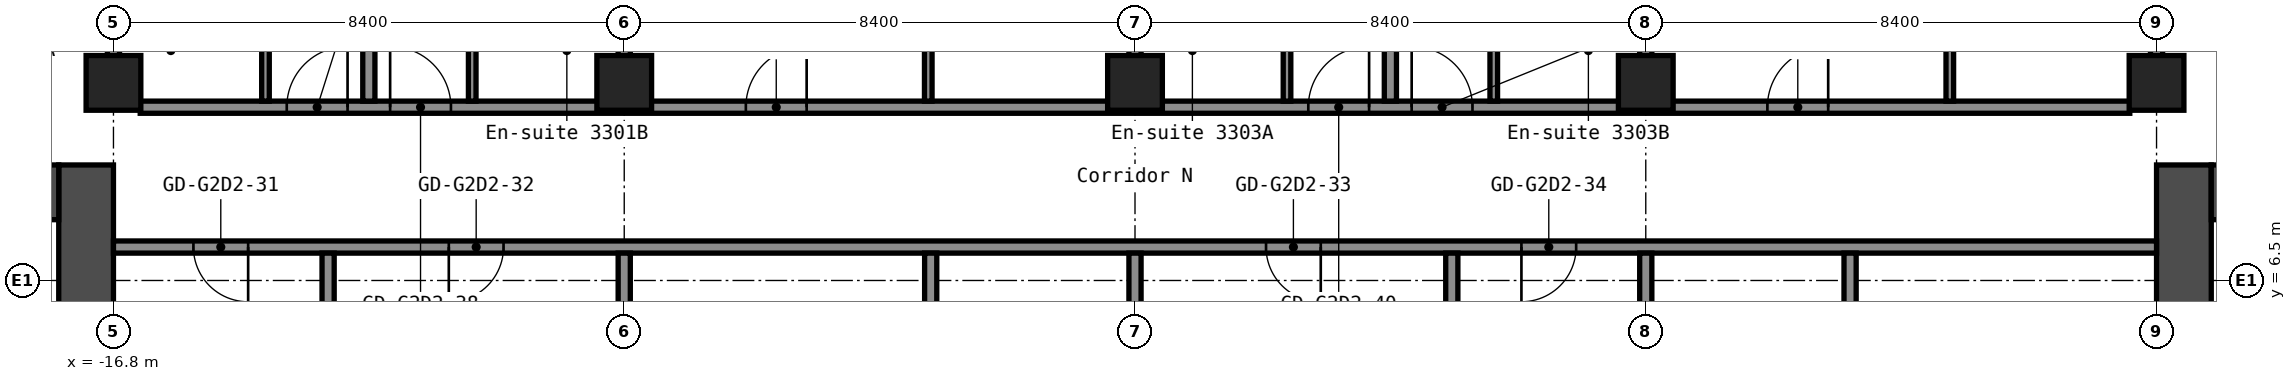
"""IFC4 building model, lengths in metres.
Left out: names, types, materials, properties, quantities, classifications, styles, units other than length and angle.
Written with IfcOpenShell. Run it as: python <this file> out.ifc"""

import sys

from ifc_helpers import new_model, si_unit, direction, frame, frame_2d, origin, origin_2d, place, context, subcontext, project, spatial, rectangle, hollow_rectangle, extrude, element, fill, save


model = new_model("IFC4")
c1 = context("Model", 3, precision=1e-05, world=origin(), true_north=direction((0.0, 1.0)))
c2 = subcontext(c1, "Body", "Model", "MODEL_VIEW")
j1 = project(units=[si_unit("LENGTHUNIT", "METRE"), si_unit("PLANEANGLEUNIT", "RADIAN")], contexts=[c1])
p1 = place(None, origin())
s1 = spatial("IfcSite", under=j1, at=p1, CompositionType="ELEMENT")
p2 = place(p1, origin())
s2 = spatial("IfcBuilding", under=s1, at=p2, CompositionType="ELEMENT")
p3 = place(p2, frame((0.0, 0.0, 117.0)))
s3 = spatial("IfcBuildingStorey", under=s2, at=p3, CompositionType="ELEMENT", Elevation=117.0)
for number, where, z_axis, x_axis in (
    (1, (-16.8, 9.75, 0.0), (0.0, 0.0, 1.0), (1.0, 0.0, 0.0)),
    (2, (-8.4, 9.75, 0.0), (0.0, 0.0, 1.0), (1.0, 0.0, 0.0)),
    (3, (0.0, 9.75, 0.0), (0.0, 0.0, 1.0), (1.0, 0.0, 0.0)),
    (4, (8.4, 9.75, 0.0), (0.0, 0.0, 1.0), (1.0, 0.0, 0.0)),
    (5, (16.8, 9.75, 0.0), (0.0, 0.0, 1.0), (1.0, 0.0, 0.0)),
):
    element("IfcColumn", number, at=place(p3, frame(where, z_axis=z_axis, x_axis=x_axis)), inside=s3, PredefinedType="COLUMN", context=c2, shape_type="SweptSolid", body=[
        extrude(hollow_rectangle(XDim=0.9, YDim=0.9, WallThickness=0.036, at=origin_2d()), origin(), (0.0, 0.0, 1.0), 2.9),
    ])
p4 = place(p3, frame((-17.25, -8.4, 0.0), z_axis=(0.0, 0.0, 1.0), x_axis=(0.0, 1.0, 0.0)))
e6 = element("IfcWall", 6, at=p4, inside=s3, PredefinedType="SHEAR", context=c2, shape_type="SweptSolid", body=[
    extrude(rectangle(XDim=16.8, YDim=0.9, at=frame_2d((8.4, 0.0))), origin(), (0.0, 0.0, 1.0), 2.9),
])
p5 = place(p4, frame((7.6, 0.0, 0.0)))
e7 = element("IfcOpeningElement", 7, at=p5, cuts=e6, PredefinedType="OPENING", context=c2, shape_type="SweptSolid", body=[
    extrude(rectangle(XDim=1.2, YDim=2.1, at=frame_2d((0.6, 1.05))), frame((0.0, 0.46, 0.0), z_axis=(0.0, -1.0, 0.0), x_axis=(1.0, 0.0, 0.0)), (0.0, 0.0, 1.0), 0.92),
])
p6 = place(p3, frame((-32.7, 7.95, 0.0), z_axis=(0.0, 0.0, 1.0), x_axis=(1.0, 0.0, 0.0)))
e8 = element("IfcWall", 8, at=p6, inside=s3, PredefinedType="SHEAR", context=c2, shape_type="SweptSolid", body=[
    extrude(rectangle(XDim=15.0, YDim=0.9, at=frame_2d((7.5, 0.0))), origin(), (0.0, 0.0, 1.0), 2.9),
])
p7 = place(p6, frame((3.4, 0.0, 0.0)))
e9 = element("IfcOpeningElement", 9, at=p7, cuts=e8, PredefinedType="OPENING", context=c2, shape_type="SweptSolid", body=[
    extrude(rectangle(XDim=1.2, YDim=2.1, at=frame_2d((0.6, 1.05))), frame((0.0, 0.46, 0.0), z_axis=(0.0, -1.0, 0.0), x_axis=(1.0, 0.0, 0.0)), (0.0, 0.0, 1.0), 0.92),
])
p8 = place(p6, frame((0.75, 0.0, 0.0)))
e10 = element("IfcOpeningElement", 10, at=p8, cuts=e8, PredefinedType="OPENING", context=c2, shape_type="SweptSolid", body=[
    extrude(rectangle(XDim=0.9, YDim=2.1, at=frame_2d((0.45, 1.05))), frame((0.0, 0.46, 0.0), z_axis=(0.0, -1.0, 0.0), x_axis=(1.0, 0.0, 0.0)), (0.0, 0.0, 1.0), 0.92),
])
p9 = place(p3, frame((17.25, -8.4, 0.0), z_axis=(0.0, 0.0, 1.0), x_axis=(0.0, 1.0, 0.0)))
e11 = element("IfcWall", 11, at=p9, inside=s3, PredefinedType="SHEAR", context=c2, shape_type="SweptSolid", body=[
    extrude(rectangle(XDim=16.8, YDim=0.9, at=frame_2d((8.4, 0.0))), origin(), (0.0, 0.0, 1.0), 2.9),
])
p10 = place(p9, frame((7.6, 0.0, 0.0)))
e12 = element("IfcOpeningElement", 12, at=p10, cuts=e11, PredefinedType="OPENING", context=c2, shape_type="SweptSolid", body=[
    extrude(rectangle(XDim=1.2, YDim=2.1, at=frame_2d((0.6, 1.05))), frame((0.0, 0.46, 0.0), z_axis=(0.0, -1.0, 0.0), x_axis=(1.0, 0.0, 0.0)), (0.0, 0.0, 1.0), 0.92),
])
p11 = place(p3, frame((17.7, 7.95, 0.0), z_axis=(0.0, 0.0, 1.0), x_axis=(1.0, 0.0, 0.0)))
e13 = element("IfcWall", 13, at=p11, inside=s3, PredefinedType="SHEAR", context=c2, shape_type="SweptSolid", body=[
    extrude(rectangle(XDim=15.0, YDim=0.9, at=frame_2d((7.5, 0.0))), origin(), (0.0, 0.0, 1.0), 2.9),
])
p12 = place(p11, frame((10.4, 0.0, 0.0)))
e14 = element("IfcOpeningElement", 14, at=p12, cuts=e13, PredefinedType="OPENING", context=c2, shape_type="SweptSolid", body=[
    extrude(rectangle(XDim=1.2, YDim=2.1, at=frame_2d((0.6, 1.05))), frame((0.0, 0.46, 0.0), z_axis=(0.0, -1.0, 0.0), x_axis=(1.0, 0.0, 0.0)), (0.0, 0.0, 1.0), 0.92),
])
p13 = place(p11, frame((13.35, 0.0, 0.0)))
e15 = element("IfcOpeningElement", 15, at=p13, cuts=e13, PredefinedType="OPENING", context=c2, shape_type="SweptSolid", body=[
    extrude(rectangle(XDim=0.9, YDim=2.1, at=frame_2d((0.45, 1.05))), frame((0.0, 0.46, 0.0), z_axis=(0.0, -1.0, 0.0), x_axis=(1.0, 0.0, 0.0)), (0.0, 0.0, 1.0), 0.92),
])
p14 = place(p3, frame((-16.8, 7.05, 0.0), z_axis=(0.0, 0.0, 1.0), x_axis=(1.0, 0.0, 0.0)))
e16 = element("IfcWall", 16, at=p14, inside=s3, PredefinedType="PARTITIONING", context=c2, shape_type="SweptSolid", body=[
    extrude(rectangle(XDim=33.6, YDim=0.2, at=frame_2d((16.8, 0.0))), origin(), (0.0, 0.0, 1.0), 2.9),
])
p15 = place(p14, frame((1.315, 0.0, 0.0)))
e17 = element("IfcOpeningElement", 17, at=p15, cuts=e16, PredefinedType="OPENING", context=c2, shape_type="SweptSolid", body=[
    extrude(rectangle(XDim=0.9, YDim=2.1, at=frame_2d((0.45, 1.05))), frame((0.0, 0.11, 0.0), z_axis=(0.0, -1.0, 0.0), x_axis=(1.0, 0.0, 0.0)), (0.0, 0.0, 1.0), 0.22),
])
p16 = place(p14, frame((5.515, 0.0, 0.0)))
e18 = element("IfcOpeningElement", 18, at=p16, cuts=e16, PredefinedType="OPENING", context=c2, shape_type="SweptSolid", body=[
    extrude(rectangle(XDim=0.9, YDim=2.1, at=frame_2d((0.45, 1.05))), frame((0.0, 0.11, 0.0), z_axis=(0.0, -1.0, 0.0), x_axis=(1.0, 0.0, 0.0)), (0.0, 0.0, 1.0), 0.22),
])
p17 = place(p14, frame((18.955, 0.0, 0.0)))
e19 = element("IfcOpeningElement", 19, at=p17, cuts=e16, PredefinedType="OPENING", context=c2, shape_type="SweptSolid", body=[
    extrude(rectangle(XDim=0.9, YDim=2.1, at=frame_2d((0.45, 1.05))), frame((0.0, 0.11, 0.0), z_axis=(0.0, -1.0, 0.0), x_axis=(1.0, 0.0, 0.0)), (0.0, 0.0, 1.0), 0.22),
])
p18 = place(p14, frame((23.155, 0.0, 0.0)))
e20 = element("IfcOpeningElement", 20, at=p18, cuts=e16, PredefinedType="OPENING", context=c2, shape_type="SweptSolid", body=[
    extrude(rectangle(XDim=0.9, YDim=2.1, at=frame_2d((0.45, 1.05))), frame((0.0, 0.11, 0.0), z_axis=(0.0, -1.0, 0.0), x_axis=(1.0, 0.0, 0.0)), (0.0, 0.0, 1.0), 0.22),
])
p19 = place(p3, frame((-16.36, 9.35, 0.0), z_axis=(0.0, 0.0, 1.0), x_axis=(1.0, 0.0, 0.0)))
e21 = element("IfcWall", 21, at=p19, inside=s3, PredefinedType="PARTITIONING", context=c2, shape_type="SweptSolid", body=[
    extrude(rectangle(XDim=32.72, YDim=0.2, at=frame_2d((16.36, 0.0))), origin(), (0.0, 0.0, 1.0), 2.9),
])
p20 = place(p19, frame((2.41, 0.0, 0.0)))
e22 = element("IfcOpeningElement", 22, at=p20, cuts=e21, PredefinedType="OPENING", context=c2, shape_type="SweptSolid", body=[
    extrude(rectangle(XDim=1.0, YDim=2.1, at=frame_2d((0.5, 1.05))), frame((0.0, 0.11, 0.0), z_axis=(0.0, -1.0, 0.0), x_axis=(1.0, 0.0, 0.0)), (0.0, 0.0, 1.0), 0.22),
])
p21 = place(p19, frame((4.11, 0.0, 0.0)))
e23 = element("IfcOpeningElement", 23, at=p21, cuts=e21, PredefinedType="OPENING", context=c2, shape_type="SweptSolid", body=[
    extrude(rectangle(XDim=1.0, YDim=2.1, at=frame_2d((0.5, 1.05))), frame((0.0, 0.11, 0.0), z_axis=(0.0, -1.0, 0.0), x_axis=(1.0, 0.0, 0.0)), (0.0, 0.0, 1.0), 0.22),
])
p22 = place(p19, frame((9.96, 0.0, 0.0)))
e24 = element("IfcOpeningElement", 24, at=p22, cuts=e21, PredefinedType="OPENING", context=c2, shape_type="SweptSolid", body=[
    extrude(rectangle(XDim=1.0, YDim=2.1, at=frame_2d((0.5, 1.05))), frame((0.0, 0.11, 0.0), z_axis=(0.0, -1.0, 0.0), x_axis=(1.0, 0.0, 0.0)), (0.0, 0.0, 1.0), 0.22),
])
p23 = place(p19, frame((19.21, 0.0, 0.0)))
e25 = element("IfcOpeningElement", 25, at=p23, cuts=e21, PredefinedType="OPENING", context=c2, shape_type="SweptSolid", body=[
    extrude(rectangle(XDim=1.0, YDim=2.1, at=frame_2d((0.5, 1.05))), frame((0.0, 0.11, 0.0), z_axis=(0.0, -1.0, 0.0), x_axis=(1.0, 0.0, 0.0)), (0.0, 0.0, 1.0), 0.22),
])
p24 = place(p19, frame((20.91, 0.0, 0.0)))
e26 = element("IfcOpeningElement", 26, at=p24, cuts=e21, PredefinedType="OPENING", context=c2, shape_type="SweptSolid", body=[
    extrude(rectangle(XDim=1.0, YDim=2.1, at=frame_2d((0.5, 1.05))), frame((0.0, 0.11, 0.0), z_axis=(0.0, -1.0, 0.0), x_axis=(1.0, 0.0, 0.0)), (0.0, 0.0, 1.0), 0.22),
])
p25 = place(p19, frame((26.76, 0.0, 0.0)))
e27 = element("IfcOpeningElement", 27, at=p25, cuts=e21, PredefinedType="OPENING", context=c2, shape_type="SweptSolid", body=[
    extrude(rectangle(XDim=1.0, YDim=2.1, at=frame_2d((0.5, 1.05))), frame((0.0, 0.11, 0.0), z_axis=(0.0, -1.0, 0.0), x_axis=(1.0, 0.0, 0.0)), (0.0, 0.0, 1.0), 0.22),
])
p26 = place(p3, frame((-16.8, 10.19, 0.0), z_axis=(0.0, 0.0, 1.0), x_axis=(0.0, 1.0, 0.0)))
e28 = element("IfcWall", 28, at=p26, inside=s3, PredefinedType="PARTITIONING", context=c2, shape_type="SweptSolid", body=[
    extrude(rectangle(XDim=13.36, YDim=0.2, at=frame_2d((6.68, 0.0))), origin(), (0.0, 0.0, 1.0), 2.9),
])
p27 = place(p3, frame((-14.3, 9.45, 0.0), z_axis=(0.0, 0.0, 1.0), x_axis=(0.0, 1.0, 0.0)))
e29 = element("IfcWall", 29, at=p27, inside=s3, PredefinedType="PARTITIONING", context=c2, shape_type="SweptSolid", body=[
    extrude(rectangle(XDim=2.9, YDim=0.125, at=frame_2d((1.45, 0.0))), origin(), (0.0, 0.0, 1.0), 2.9),
])
p28 = place(p27, frame((1.5, 0.0, 0.0)))
e30 = element("IfcOpeningElement", 30, at=p28, cuts=e29, PredefinedType="OPENING", context=c2, shape_type="SweptSolid", body=[
    extrude(rectangle(XDim=0.8, YDim=2.1, at=frame_2d((0.4, 1.05))), frame((0.0, 0.073, 0.0), z_axis=(0.0, -1.0, 0.0), x_axis=(1.0, 0.0, 0.0)), (0.0, 0.0, 1.0), 0.145),
])
p29 = place(p3, frame((-13.27, 1.05, 0.0), z_axis=(0.0, 0.0, 1.0), x_axis=(0.0, 1.0, 0.0)))
e31 = element("IfcWall", 31, at=p29, inside=s3, PredefinedType="PARTITIONING", context=c2, shape_type="SweptSolid", body=[
    extrude(rectangle(XDim=5.9, YDim=0.2, at=frame_2d((2.95, 0.0))), origin(), (0.0, 0.0, 1.0), 2.9),
])
p30 = place(p3, frame((-12.6, 9.45, 0.0), z_axis=(0.0, 0.0, 1.0), x_axis=(0.0, 1.0, 0.0)))
e32 = element("IfcWall", 32, at=p30, inside=s3, PredefinedType="PARTITIONING", context=c2, shape_type="SweptSolid", body=[
    extrude(rectangle(XDim=14.1, YDim=0.2, at=frame_2d((7.05, 0.0))), origin(), (0.0, 0.0, 1.0), 2.9),
])
p31 = place(p3, frame((-10.9, 9.45, 0.0), z_axis=(0.0, 0.0, 1.0), x_axis=(0.0, 1.0, 0.0)))
e33 = element("IfcWall", 33, at=p31, inside=s3, PredefinedType="PARTITIONING", context=c2, shape_type="SweptSolid", body=[
    extrude(rectangle(XDim=2.9, YDim=0.125, at=frame_2d((1.45, 0.0))), origin(), (0.0, 0.0, 1.0), 2.9),
])
p32 = place(p31, frame((1.5, 0.0, 0.0)))
e34 = element("IfcOpeningElement", 34, at=p32, cuts=e33, PredefinedType="OPENING", context=c2, shape_type="SweptSolid", body=[
    extrude(rectangle(XDim=0.8, YDim=2.1, at=frame_2d((0.4, 1.05))), frame((0.0, 0.073, 0.0), z_axis=(0.0, -1.0, 0.0), x_axis=(1.0, 0.0, 0.0)), (0.0, 0.0, 1.0), 0.145),
])
p33 = place(p3, frame((-8.4, 1.05, 0.0), z_axis=(0.0, 0.0, 1.0), x_axis=(0.0, 1.0, 0.0)))
e35 = element("IfcWall", 35, at=p33, inside=s3, PredefinedType="PARTITIONING", context=c2, shape_type="SweptSolid", body=[
    extrude(rectangle(XDim=5.9, YDim=0.2, at=frame_2d((2.95, 0.0))), origin(), (0.0, 0.0, 1.0), 2.9),
])
p34 = place(p3, frame((-8.4, 10.19, 0.0), z_axis=(0.0, 0.0, 1.0), x_axis=(0.0, 1.0, 0.0)))
e36 = element("IfcWall", 36, at=p34, inside=s3, PredefinedType="PARTITIONING", context=c2, shape_type="SweptSolid", body=[
    extrude(rectangle(XDim=13.36, YDim=0.2, at=frame_2d((6.68, 0.0))), origin(), (0.0, 0.0, 1.0), 2.9),
])
p35 = place(p3, frame((-3.4, 9.45, 0.0), z_axis=(0.0, 0.0, 1.0), x_axis=(0.0, 1.0, 0.0)))
e37 = element("IfcWall", 37, at=p35, inside=s3, PredefinedType="PARTITIONING", context=c2, shape_type="SweptSolid", body=[
    extrude(rectangle(XDim=3.3, YDim=0.125, at=frame_2d((1.65, 0.0))), origin(), (0.0, 0.0, 1.0), 2.9),
])
for number, where, z_axis, x_axis in (
    (38, (-3.36, 1.05, 0.0), (0.0, 0.0, 1.0), (0.0, 1.0, 0.0)),
    (39, (0.0, 1.05, 0.0), (0.0, 0.0, 1.0), (0.0, 1.0, 0.0)),
):
    element("IfcWall", number, at=place(p3, frame(where, z_axis=z_axis, x_axis=x_axis)), inside=s3, PredefinedType="PARTITIONING", context=c2, shape_type="SweptSolid", body=[
        extrude(rectangle(XDim=5.9, YDim=0.2, at=frame_2d((2.95, 0.0))), origin(), (0.0, 0.0, 1.0), 2.9),
    ])
p36 = place(p3, frame((0.0, 10.19, 0.0), z_axis=(0.0, 0.0, 1.0), x_axis=(0.0, 1.0, 0.0)))
e40 = element("IfcWall", 40, at=p36, inside=s3, PredefinedType="PARTITIONING", context=c2, shape_type="SweptSolid", body=[
    extrude(rectangle(XDim=13.36, YDim=0.2, at=frame_2d((6.68, 0.0))), origin(), (0.0, 0.0, 1.0), 2.9),
])
p37 = place(p3, frame((2.5, 9.45, 0.0), z_axis=(0.0, 0.0, 1.0), x_axis=(0.0, 1.0, 0.0)))
e41 = element("IfcWall", 41, at=p37, inside=s3, PredefinedType="PARTITIONING", context=c2, shape_type="SweptSolid", body=[
    extrude(rectangle(XDim=2.9, YDim=0.125, at=frame_2d((1.45, 0.0))), origin(), (0.0, 0.0, 1.0), 2.9),
])
p38 = place(p37, frame((1.5, 0.0, 0.0)))
e42 = element("IfcOpeningElement", 42, at=p38, cuts=e41, PredefinedType="OPENING", context=c2, shape_type="SweptSolid", body=[
    extrude(rectangle(XDim=0.8, YDim=2.1, at=frame_2d((0.4, 1.05))), frame((0.0, 0.073, 0.0), z_axis=(0.0, -1.0, 0.0), x_axis=(1.0, 0.0, 0.0)), (0.0, 0.0, 1.0), 0.145),
])
p39 = place(p3, frame((4.2, 9.45, 0.0), z_axis=(0.0, 0.0, 1.0), x_axis=(0.0, 1.0, 0.0)))
e43 = element("IfcWall", 43, at=p39, inside=s3, PredefinedType="PARTITIONING", context=c2, shape_type="SweptSolid", body=[
    extrude(rectangle(XDim=14.1, YDim=0.2, at=frame_2d((7.05, 0.0))), origin(), (0.0, 0.0, 1.0), 2.9),
])
p40 = place(p3, frame((5.21, 1.05, 0.0), z_axis=(0.0, 0.0, 1.0), x_axis=(0.0, 1.0, 0.0)))
e44 = element("IfcWall", 44, at=p40, inside=s3, PredefinedType="PARTITIONING", context=c2, shape_type="SweptSolid", body=[
    extrude(rectangle(XDim=5.9, YDim=0.2, at=frame_2d((2.95, 0.0))), origin(), (0.0, 0.0, 1.0), 2.9),
])
p41 = place(p3, frame((5.9, 9.45, 0.0), z_axis=(0.0, 0.0, 1.0), x_axis=(0.0, 1.0, 0.0)))
e45 = element("IfcWall", 45, at=p41, inside=s3, PredefinedType="PARTITIONING", context=c2, shape_type="SweptSolid", body=[
    extrude(rectangle(XDim=2.9, YDim=0.125, at=frame_2d((1.45, 0.0))), origin(), (0.0, 0.0, 1.0), 2.9),
])
p42 = place(p41, frame((1.5, 0.0, 0.0)))
e46 = element("IfcOpeningElement", 46, at=p42, cuts=e45, PredefinedType="OPENING", context=c2, shape_type="SweptSolid", body=[
    extrude(rectangle(XDim=0.8, YDim=2.1, at=frame_2d((0.4, 1.05))), frame((0.0, 0.073, 0.0), z_axis=(0.0, -1.0, 0.0), x_axis=(1.0, 0.0, 0.0)), (0.0, 0.0, 1.0), 0.145),
])
p43 = place(p3, frame((8.4, 1.05, 0.0), z_axis=(0.0, 0.0, 1.0), x_axis=(0.0, 1.0, 0.0)))
e47 = element("IfcWall", 47, at=p43, inside=s3, PredefinedType="PARTITIONING", context=c2, shape_type="SweptSolid", body=[
    extrude(rectangle(XDim=5.9, YDim=0.2, at=frame_2d((2.95, 0.0))), origin(), (0.0, 0.0, 1.0), 2.9),
])
p44 = place(p3, frame((8.4, 10.19, 0.0), z_axis=(0.0, 0.0, 1.0), x_axis=(0.0, 1.0, 0.0)))
e48 = element("IfcWall", 48, at=p44, inside=s3, PredefinedType="PARTITIONING", context=c2, shape_type="SweptSolid", body=[
    extrude(rectangle(XDim=13.36, YDim=0.2, at=frame_2d((6.68, 0.0))), origin(), (0.0, 0.0, 1.0), 2.9),
])
p45 = place(p3, frame((11.76, 1.05, 0.0), z_axis=(0.0, 0.0, 1.0), x_axis=(0.0, 1.0, 0.0)))
e49 = element("IfcWall", 49, at=p45, inside=s3, PredefinedType="PARTITIONING", context=c2, shape_type="SweptSolid", body=[
    extrude(rectangle(XDim=5.9, YDim=0.2, at=frame_2d((2.95, 0.0))), origin(), (0.0, 0.0, 1.0), 2.9),
])
p46 = place(p3, frame((13.4, 9.45, 0.0), z_axis=(0.0, 0.0, 1.0), x_axis=(0.0, 1.0, 0.0)))
e50 = element("IfcWall", 50, at=p46, inside=s3, PredefinedType="PARTITIONING", context=c2, shape_type="SweptSolid", body=[
    extrude(rectangle(XDim=3.3, YDim=0.125, at=frame_2d((1.65, 0.0))), origin(), (0.0, 0.0, 1.0), 2.9),
])
p47 = place(p3, frame((16.8, 10.19, 0.0), z_axis=(0.0, 0.0, 1.0), x_axis=(0.0, 1.0, 0.0)))
e51 = element("IfcWall", 51, at=p47, inside=s3, PredefinedType="PARTITIONING", context=c2, shape_type="SweptSolid", body=[
    extrude(rectangle(XDim=13.36, YDim=0.2, at=frame_2d((6.68, 0.0))), origin(), (0.0, 0.0, 1.0), 2.9),
])
p48 = place(p15, origin())
e52 = element("IfcDoor", 52, at=p48, inside=s3, OperationType="SINGLE_SWING_RIGHT", PredefinedType="DOOR", context=c2, shape_type="SweptSolid", body=[
    extrude(rectangle(XDim=0.9, YDim=2.1, at=frame_2d((0.45, 1.05))), frame((0.0, 0.025, 0.0), z_axis=(0.0, -1.0, 0.0), x_axis=(1.0, 0.0, 0.0)), (0.0, 0.0, 1.0), 0.05),
])
fill(e17, e52)
p49 = place(p16, origin())
e53 = element("IfcDoor", 53, at=p49, inside=s3, OperationType="SINGLE_SWING_LEFT", PredefinedType="DOOR", context=c2, shape_type="SweptSolid", body=[
    extrude(rectangle(XDim=0.9, YDim=2.1, at=frame_2d((0.45, 1.05))), frame((0.0, 0.025, 0.0), z_axis=(0.0, -1.0, 0.0), x_axis=(1.0, 0.0, 0.0)), (0.0, 0.0, 1.0), 0.05),
])
fill(e18, e53)
p50 = place(p17, origin())
e54 = element("IfcDoor", 54, at=p50, inside=s3, OperationType="SINGLE_SWING_RIGHT", PredefinedType="DOOR", context=c2, shape_type="SweptSolid", body=[
    extrude(rectangle(XDim=0.9, YDim=2.1, at=frame_2d((0.45, 1.05))), frame((0.0, 0.025, 0.0), z_axis=(0.0, -1.0, 0.0), x_axis=(1.0, 0.0, 0.0)), (0.0, 0.0, 1.0), 0.05),
])
fill(e19, e54)
p51 = place(p18, origin())
e55 = element("IfcDoor", 55, at=p51, inside=s3, OperationType="SINGLE_SWING_LEFT", PredefinedType="DOOR", context=c2, shape_type="SweptSolid", body=[
    extrude(rectangle(XDim=0.9, YDim=2.1, at=frame_2d((0.45, 1.05))), frame((0.0, 0.025, 0.0), z_axis=(0.0, -1.0, 0.0), x_axis=(1.0, 0.0, 0.0)), (0.0, 0.0, 1.0), 0.05),
])
fill(e20, e55)
p52 = place(p20, origin())
e56 = element("IfcDoor", 56, at=p52, inside=s3, OperationType="SINGLE_SWING_LEFT", PredefinedType="DOOR", context=c2, shape_type="SweptSolid", body=[
    extrude(rectangle(XDim=1.0, YDim=2.1, at=frame_2d((0.5, 1.05))), frame((0.0, 0.025, 0.0), z_axis=(0.0, -1.0, 0.0), x_axis=(1.0, 0.0, 0.0)), (0.0, 0.0, 1.0), 0.05),
])
fill(e22, e56)
p53 = place(p21, origin())
e57 = element("IfcDoor", 57, at=p53, inside=s3, OperationType="SINGLE_SWING_RIGHT", PredefinedType="DOOR", context=c2, shape_type="SweptSolid", body=[
    extrude(rectangle(XDim=1.0, YDim=2.1, at=frame_2d((0.5, 1.05))), frame((0.0, 0.025, 0.0), z_axis=(0.0, -1.0, 0.0), x_axis=(1.0, 0.0, 0.0)), (0.0, 0.0, 1.0), 0.05),
])
fill(e23, e57)
p54 = place(p22, origin())
e58 = element("IfcDoor", 58, at=p54, inside=s3, OperationType="SINGLE_SWING_LEFT", PredefinedType="DOOR", context=c2, shape_type="SweptSolid", body=[
    extrude(rectangle(XDim=1.0, YDim=2.1, at=frame_2d((0.5, 1.05))), frame((0.0, 0.025, 0.0), z_axis=(0.0, -1.0, 0.0), x_axis=(1.0, 0.0, 0.0)), (0.0, 0.0, 1.0), 0.05),
])
fill(e24, e58)
p55 = place(p23, origin())
e59 = element("IfcDoor", 59, at=p55, inside=s3, OperationType="SINGLE_SWING_LEFT", PredefinedType="DOOR", context=c2, shape_type="SweptSolid", body=[
    extrude(rectangle(XDim=1.0, YDim=2.1, at=frame_2d((0.5, 1.05))), frame((0.0, 0.025, 0.0), z_axis=(0.0, -1.0, 0.0), x_axis=(1.0, 0.0, 0.0)), (0.0, 0.0, 1.0), 0.05),
])
fill(e25, e59)
p56 = place(p24, origin())
e60 = element("IfcDoor", 60, at=p56, inside=s3, OperationType="SINGLE_SWING_RIGHT", PredefinedType="DOOR", context=c2, shape_type="SweptSolid", body=[
    extrude(rectangle(XDim=1.0, YDim=2.1, at=frame_2d((0.5, 1.05))), frame((0.0, 0.025, 0.0), z_axis=(0.0, -1.0, 0.0), x_axis=(1.0, 0.0, 0.0)), (0.0, 0.0, 1.0), 0.05),
])
fill(e26, e60)
p57 = place(p25, origin())
e61 = element("IfcDoor", 61, at=p57, inside=s3, OperationType="SINGLE_SWING_LEFT", PredefinedType="DOOR", context=c2, shape_type="SweptSolid", body=[
    extrude(rectangle(XDim=1.0, YDim=2.1, at=frame_2d((0.5, 1.05))), frame((0.0, 0.025, 0.0), z_axis=(0.0, -1.0, 0.0), x_axis=(1.0, 0.0, 0.0)), (0.0, 0.0, 1.0), 0.05),
])
fill(e27, e61)
save(model, sys.argv[1])
